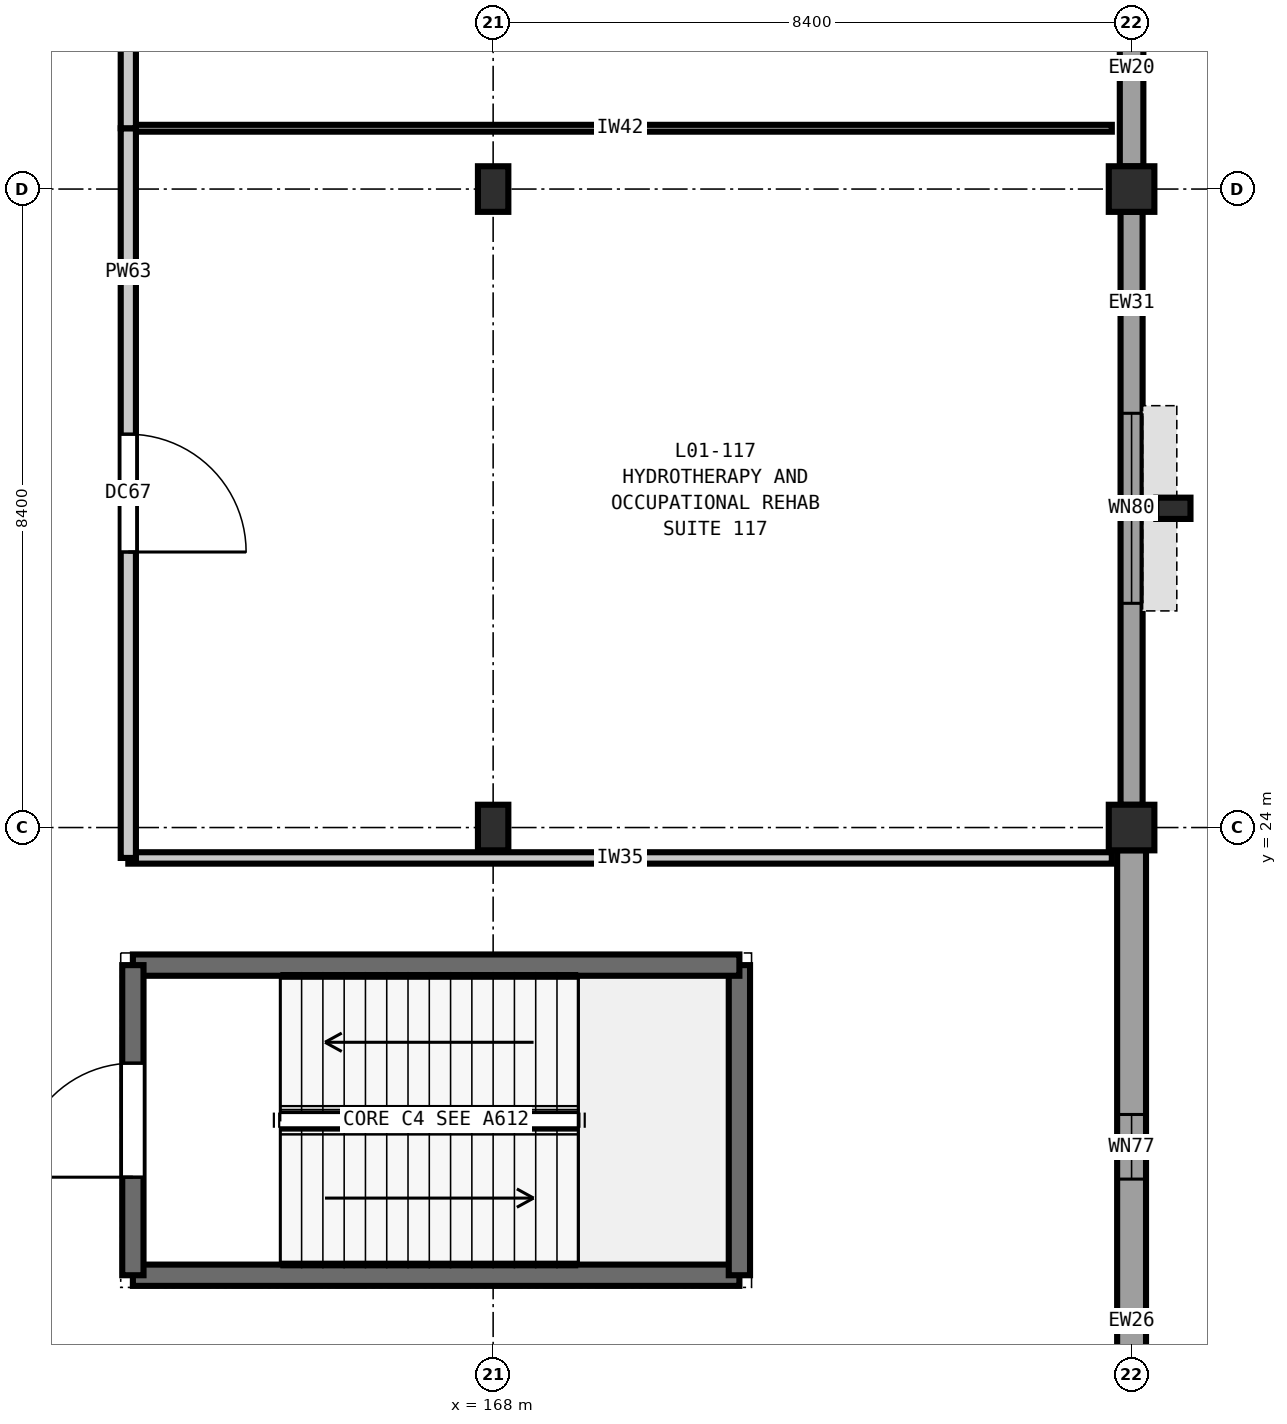
"""IFC4 building model, lengths in metres.
Left out: names, types, materials, properties, quantities, classifications, styles, units other than length and angle.
Written with IfcOpenShell. Run it as: python <this file> out.ifc"""

import sys

from ifc_helpers import new_model, si_unit, direction, frame, frame_2d, origin, origin_2d, place, context, subcontext, project, spatial, rectangle, extrude, element, fill, save


model = new_model("IFC4")
c1 = context("Model", 3, precision=1e-05, world=origin(), true_north=direction((0.0, 1.0)))
c2 = subcontext(c1, "Body", "Model", "MODEL_VIEW")
j1 = project(units=[si_unit("LENGTHUNIT", "METRE"), si_unit("PLANEANGLEUNIT", "RADIAN")], contexts=[c1])
p1 = place(None, origin())
s1 = spatial("IfcSite", under=j1, at=p1, CompositionType="ELEMENT")
p2 = place(p1, origin())
s2 = spatial("IfcBuilding", under=s1, at=p2, CompositionType="ELEMENT")
p3 = place(p2, frame((0.0, 0.0, 5.4)))
s3 = spatial("IfcBuildingStorey", under=s2, at=p3, CompositionType="ELEMENT", Elevation=5.4)
for number, where, z_axis, x_axis in (
    (1, (168.0, 24.0, 0.0), (0.0, 0.0, 1.0), (1.0, 0.0, 0.0)),
    (2, (168.0, 32.4, 0.0), (0.0, 0.0, 1.0), (1.0, 0.0, 0.0)),
):
    element("IfcColumn", number, at=place(p3, frame(where, z_axis=z_axis, x_axis=x_axis)), inside=s3, PredefinedType="COLUMN", context=c2, shape_type="SweptSolid", body=[
        extrude(rectangle(XDim=0.4, YDim=0.6, at=origin_2d()), origin(), (0.0, 0.0, 1.0), 5.4),
    ])
for number, where, z_axis, x_axis in (
    (3, (176.4, 24.0, 0.0), (0.0, 0.0, 1.0), (1.0, 0.0, 0.0)),
    (4, (176.4, 32.4, 0.0), (0.0, 0.0, 1.0), (1.0, 0.0, 0.0)),
):
    element("IfcColumn", number, at=place(p3, frame(where, z_axis=z_axis, x_axis=x_axis)), inside=s3, PredefinedType="COLUMN", context=c2, shape_type="SweptSolid", body=[
        extrude(rectangle(XDim=0.6, YDim=0.6, at=origin_2d()), origin(), (0.0, 0.0, 1.0), 5.4),
    ])
p4 = place(p3, frame((176.95, 28.2, 0.0), z_axis=(0.0, 0.0, 1.0), x_axis=(1.0, 0.0, 0.0)))
e5 = element("IfcColumn", 5, at=p4, inside=s3, PredefinedType="PILASTER", context=c2, shape_type="SweptSolid", body=[
    extrude(rectangle(XDim=0.45, YDim=0.28, at=origin_2d()), origin(), (0.0, 0.0, 1.0), 5.4),
])
p5 = place(p3, frame((176.4, 40.502, 0.0), z_axis=(0.0, 0.0, 1.0), x_axis=(0.0, -1.0, 0.0)))
e6 = element("IfcWall", 6, at=p5, inside=s3, PredefinedType="SOLIDWALL", context=c2, shape_type="SweptSolid", body=[
    extrude(rectangle(XDim=7.804, YDim=0.31, at=frame_2d((3.902, 0.0))), origin(), (0.0, 0.0, 1.0), 4.68),
])
p6 = place(p5, frame((2.852, 0.0, 0.9)))
e7 = element("IfcOpeningElement", 7, at=p6, cuts=e6, PredefinedType="OPENING", context=c2, shape_type="SweptSolid", body=[
    extrude(rectangle(XDim=2.1, YDim=2.35, at=frame_2d((1.05, 1.175))), frame((0.0, 0.165, 0.0), z_axis=(0.0, -1.0, 0.0), x_axis=(1.0, 0.0, 0.0)), (0.0, 0.0, 1.0), 0.33),
])
p7 = place(p3, frame((176.4, 32.102, 0.0), z_axis=(0.0, 0.0, 1.0), x_axis=(0.0, -1.0, 0.0)))
e8 = element("IfcWall", 8, at=p7, inside=s3, PredefinedType="SOLIDWALL", context=c2, shape_type="SweptSolid", body=[
    extrude(rectangle(XDim=7.804, YDim=0.29, at=frame_2d((3.902, 0.0))), origin(), (0.0, 0.0, 1.0), 4.68),
])
p8 = place(p7, frame((2.652, 0.0, 0.9)))
e9 = element("IfcOpeningElement", 9, at=p8, cuts=e8, PredefinedType="OPENING", context=c2, shape_type="SweptSolid", body=[
    extrude(rectangle(XDim=2.5, YDim=2.35, at=frame_2d((1.25, 1.175))), frame((0.0, 0.155, 0.0), z_axis=(0.0, -1.0, 0.0), x_axis=(1.0, 0.0, 0.0)), (0.0, 0.0, 1.0), 0.31),
])
p9 = place(p3, frame((176.4, 23.702, 0.0), z_axis=(0.0, 0.0, 1.0), x_axis=(0.0, -1.0, 0.0)))
e10 = element("IfcWall", 10, at=p9, inside=s3, PredefinedType="SOLIDWALL", context=c2, shape_type="SweptSolid", body=[
    extrude(rectangle(XDim=7.804, YDim=0.38, at=frame_2d((3.902, 0.0))), origin(), (0.0, 0.0, 1.0), 4.68),
])
p10 = place(p9, frame((3.477, 0.0, 0.9)))
e11 = element("IfcOpeningElement", 11, at=p10, cuts=e10, PredefinedType="OPENING", context=c2, shape_type="SweptSolid", body=[
    extrude(rectangle(XDim=0.85, YDim=1.4, at=frame_2d((0.425, 0.7))), frame((0.0, 0.2, 0.0), z_axis=(0.0, -1.0, 0.0), x_axis=(1.0, 0.0, 0.0)), (0.0, 0.0, 1.0), 0.4),
])
p11 = place(p3, frame((163.26, 18.11, 0.0), z_axis=(0.0, 0.0, 1.0), x_axis=(1.0, 0.0, 0.0)))
e12 = element("IfcWall", 12, at=p11, inside=s3, PredefinedType="SHEAR", context=c2, shape_type="SweptSolid", body=[
    extrude(rectangle(XDim=7.98, YDim=0.28, at=frame_2d((3.99, 0.0))), origin(), (0.0, 0.0, 1.0), 5.4),
])
p12 = place(p3, frame((171.24, 18.11, 0.0), z_axis=(0.0, 0.0, 1.0), x_axis=(0.0, 1.0, 0.0)))
e13 = element("IfcWall", 13, at=p12, inside=s3, PredefinedType="SHEAR", context=c2, shape_type="SweptSolid", body=[
    extrude(rectangle(XDim=4.08, YDim=0.28, at=frame_2d((2.04, 0.0))), origin(), (0.0, 0.0, 1.0), 5.4),
])
p13 = place(p3, frame((171.24, 22.19, 0.0), z_axis=(0.0, 0.0, 1.0), x_axis=(-1.0, 0.0, 0.0)))
e14 = element("IfcWall", 14, at=p13, inside=s3, PredefinedType="SHEAR", context=c2, shape_type="SweptSolid", body=[
    extrude(rectangle(XDim=7.98, YDim=0.28, at=frame_2d((3.99, 0.0))), origin(), (0.0, 0.0, 1.0), 5.4),
])
p14 = place(p3, frame((163.26, 22.19, 0.0), z_axis=(0.0, 0.0, 1.0), x_axis=(0.0, -1.0, 0.0)))
e15 = element("IfcWall", 15, at=p14, inside=s3, PredefinedType="SHEAR", context=c2, shape_type="SweptSolid", body=[
    extrude(rectangle(XDim=4.08, YDim=0.28, at=frame_2d((2.04, 0.0))), origin(), (0.0, 0.0, 1.0), 5.4),
])
p15 = place(p14, frame((1.29, 0.0, 0.0)))
e16 = element("IfcOpeningElement", 16, at=p15, cuts=e15, PredefinedType="OPENING", context=c2, shape_type="SweptSolid", body=[
    extrude(rectangle(XDim=1.5, YDim=2.2, at=frame_2d((0.75, 1.1))), frame((0.0, 0.15, 0.0), z_axis=(0.0, -1.0, 0.0), x_axis=(1.0, 0.0, 0.0)), (0.0, 0.0, 1.0), 0.3),
])
p16 = place(p3, frame((163.2, 23.6, 0.0), z_axis=(0.0, 0.0, 1.0), x_axis=(1.0, 0.0, 0.0)))
e17 = element("IfcWall", 17, at=p16, inside=s3, PredefinedType="PARTITIONING", context=c2, shape_type="SweptSolid", body=[
    extrude(rectangle(XDim=12.94, YDim=0.15, at=frame_2d((6.47, 0.0))), origin(), (0.0, 0.0, 1.0), 5.05),
])
p17 = place(p3, frame((163.2, 33.2, 0.0), z_axis=(0.0, 0.0, 1.0), x_axis=(1.0, 0.0, 0.0)))
e18 = element("IfcWall", 18, at=p17, inside=s3, PredefinedType="PARTITIONING", context=c2, shape_type="SweptSolid", body=[
    extrude(rectangle(XDim=12.94, YDim=0.09, at=frame_2d((6.47, 0.0))), origin(), (0.0, 0.0, 1.0), 5.05),
])
p18 = place(p3, frame((163.2, 23.6, 0.0), z_axis=(0.0, 0.0, 1.0), x_axis=(0.0, 1.0, 0.0)))
e19 = element("IfcWall", 19, at=p18, inside=s3, PredefinedType="PARTITIONING", context=c2, shape_type="SweptSolid", body=[
    extrude(rectangle(XDim=9.6, YDim=0.2, at=frame_2d((4.8, 0.0))), origin(), (0.0, 0.0, 1.0), 5.05),
])
p19 = place(p18, frame((4.025, 0.0, 0.0)))
e20 = element("IfcOpeningElement", 20, at=p19, cuts=e19, PredefinedType="OPENING", context=c2, shape_type="SweptSolid", body=[
    extrude(rectangle(XDim=1.55, YDim=2.25, at=frame_2d((0.775, 1.125))), frame((0.0, 0.11, 0.0), z_axis=(0.0, -1.0, 0.0), x_axis=(1.0, 0.0, 0.0)), (0.0, 0.0, 1.0), 0.22),
])
p20 = place(p3, frame((163.2, 33.2, 0.0), z_axis=(0.0, 0.0, 1.0), x_axis=(0.0, 1.0, 0.0)))
e21 = element("IfcWall", 21, at=p20, inside=s3, PredefinedType="PARTITIONING", context=c2, shape_type="SweptSolid", body=[
    extrude(rectangle(XDim=5.6, YDim=0.2, at=frame_2d((2.8, 0.0))), origin(), (0.0, 0.0, 1.0), 5.05),
])
p21 = place(p20, frame((1.95, 0.0, 0.0)))
e22 = element("IfcOpeningElement", 22, at=p21, cuts=e21, PredefinedType="OPENING", context=c2, shape_type="SweptSolid", body=[
    extrude(rectangle(XDim=1.7, YDim=2.3, at=frame_2d((0.85, 1.15))), frame((0.0, 0.11, 0.0), z_axis=(0.0, -1.0, 0.0), x_axis=(1.0, 0.0, 0.0)), (0.0, 0.0, 1.0), 0.22),
])
p22 = place(p8, origin())
e23 = element("IfcWindow", 23, at=p22, inside=s3, PartitioningType="DOUBLE_PANEL_VERTICAL", PredefinedType="WINDOW", context=c2, shape_type="SweptSolid", body=[
    extrude(rectangle(XDim=2.5, YDim=2.35, at=frame_2d((1.25, 1.175))), frame((0.0, 0.03, 0.0), z_axis=(0.0, -1.0, 0.0), x_axis=(1.0, 0.0, 0.0)), (0.0, 0.0, 1.0), 0.06),
])
fill(e9, e23)
p23 = place(p10, origin())
e24 = element("IfcWindow", 24, at=p23, inside=s3, PartitioningType="SINGLE_PANEL", PredefinedType="WINDOW", context=c2, shape_type="SweptSolid", body=[
    extrude(rectangle(XDim=0.85, YDim=1.4, at=frame_2d((0.425, 0.7))), frame((0.0, 0.03, 0.0), z_axis=(0.0, -1.0, 0.0), x_axis=(1.0, 0.0, 0.0)), (0.0, 0.0, 1.0), 0.06),
])
fill(e11, e24)
p24 = place(p15, frame((1.5, 0.0, 0.0), z_axis=(0.0, 0.0, 1.0), x_axis=(-1.0, 0.0, 0.0)))
e25 = element("IfcDoor", 25, at=p24, inside=s3, OperationType="SINGLE_SWING_LEFT", PredefinedType="DOOR", context=c2, shape_type="SweptSolid", body=[
    extrude(rectangle(XDim=1.5, YDim=2.2, at=frame_2d((0.75, 1.1))), frame((0.0, 0.025, 0.0), z_axis=(0.0, -1.0, 0.0), x_axis=(1.0, 0.0, 0.0)), (0.0, 0.0, 1.0), 0.05),
])
fill(e16, e25)
p25 = place(p19, frame((1.55, 0.0, 0.0), z_axis=(0.0, 0.0, 1.0), x_axis=(-1.0, 0.0, 0.0)))
e26 = element("IfcDoor", 26, at=p25, inside=s3, OperationType="SINGLE_SWING_RIGHT", PredefinedType="DOOR", context=c2, shape_type="SweptSolid", body=[
    extrude(rectangle(XDim=1.55, YDim=2.25, at=frame_2d((0.775, 1.125))), frame((0.0, 0.025, 0.0), z_axis=(0.0, -1.0, 0.0), x_axis=(1.0, 0.0, 0.0)), (0.0, 0.0, 1.0), 0.05),
])
fill(e20, e26)
save(model, sys.argv[1])
